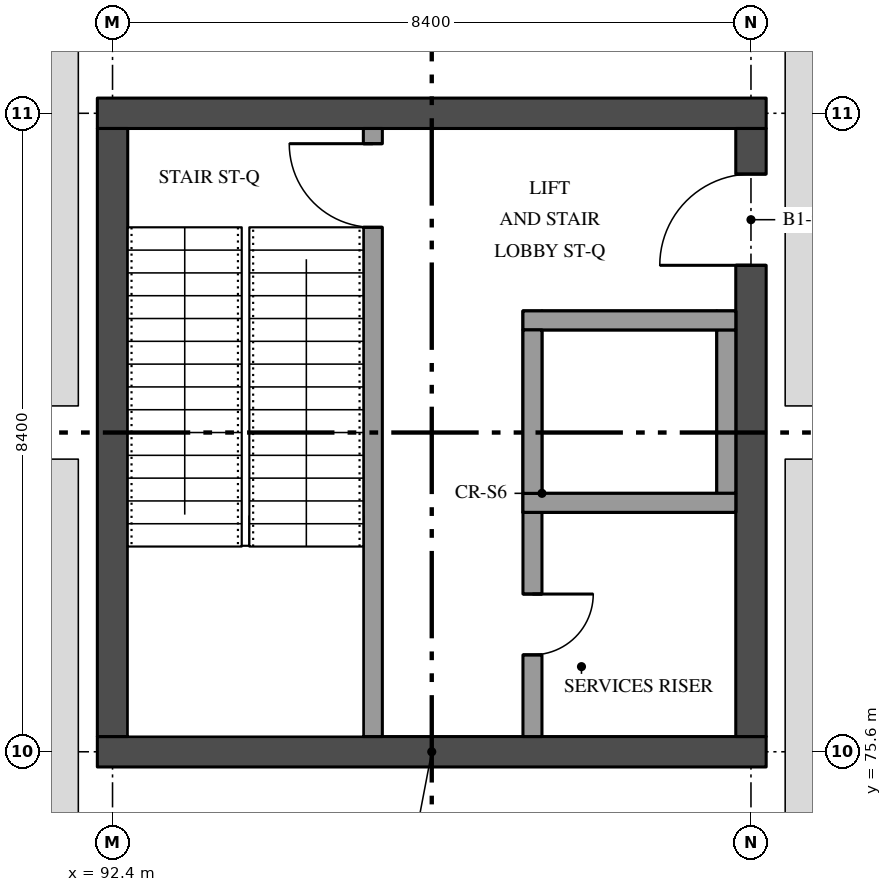
"""IFC4 building model, lengths in metres.
Left out: names, types, materials, properties, quantities, classifications, styles, units other than length and angle.
Written with IfcOpenShell. Run it as: python <this file> out.ifc"""

import sys

from ifc_helpers import new_model, si_unit, direction, frame, frame_2d, origin, place, context, subcontext, project, spatial, rectangle, extrude, element, fill, save


model = new_model("IFC4")
c1 = context("Model", 3, precision=1e-05, world=origin(), true_north=direction((0.0, 1.0)))
c2 = subcontext(c1, "Body", "Model", "MODEL_VIEW")
j1 = project(units=[si_unit("LENGTHUNIT", "METRE"), si_unit("PLANEANGLEUNIT", "RADIAN")], contexts=[c1])
p1 = place(None, origin())
s1 = spatial("IfcSite", under=j1, at=p1, CompositionType="ELEMENT")
p2 = place(p1, origin())
s2 = spatial("IfcBuilding", under=s1, at=p2, CompositionType="ELEMENT")
p3 = place(p2, frame((0.0, 0.0, -4.5)))
s3 = spatial("IfcBuildingStorey", under=s2, at=p3, CompositionType="ELEMENT", Elevation=-4.5)
for number, where, z_axis, x_axis in (
    (1, (92.2, 75.6, 0.0), (0.0, 0.0, 1.0), (1.0, 0.0, 0.0)),
    (2, (92.2, 84.0, 0.0), (0.0, 0.0, 1.0), (1.0, 0.0, 0.0)),
):
    element("IfcWall", number, at=place(p3, frame(where, z_axis=z_axis, x_axis=x_axis)), inside=s3, PredefinedType="SHEAR", context=c2, shape_type="SweptSolid", body=[
        extrude(rectangle(XDim=8.8, YDim=0.4, at=frame_2d((4.4, 0.0))), origin(), (0.0, 0.0, 1.0), 4.05),
    ])
p4 = place(p3, frame((92.4, 75.8, 0.0), z_axis=(0.0, 0.0, 1.0), x_axis=(0.0, 1.0, 0.0)))
e3 = element("IfcWall", 3, at=p4, inside=s3, PredefinedType="SHEAR", context=c2, shape_type="SweptSolid", body=[
    extrude(rectangle(XDim=8.0, YDim=0.4, at=frame_2d((4.0, 0.0))), origin(), (0.0, 0.0, 1.0), 4.05),
])
p5 = place(p3, frame((100.8, 75.8, 0.0), z_axis=(0.0, 0.0, 1.0), x_axis=(0.0, 1.0, 0.0)))
e4 = element("IfcWall", 4, at=p5, inside=s3, PredefinedType="SHEAR", context=c2, shape_type="SweptSolid", body=[
    extrude(rectangle(XDim=8.0, YDim=0.4, at=frame_2d((4.0, 0.0))), origin(), (0.0, 0.0, 1.0), 4.05),
])
p6 = place(p5, frame((6.2, 0.0, 0.0)))
e5 = element("IfcOpeningElement", 5, at=p6, cuts=e4, PredefinedType="OPENING", context=c2, shape_type="SweptSolid", body=[
    extrude(rectangle(XDim=1.2, YDim=2.1, at=frame_2d((0.6, 1.05))), frame((0.0, 0.21, 0.0), z_axis=(0.0, -1.0, 0.0), x_axis=(1.0, 0.0, 0.0)), (0.0, 0.0, 1.0), 0.42),
])
p7 = place(p3, frame((95.825, 83.8, 0.0), z_axis=(0.0, 0.0, 1.0), x_axis=(0.0, -1.0, 0.0)))
e6 = element("IfcWall", 6, at=p7, inside=s3, PredefinedType="SOLIDWALL", context=c2, shape_type="SweptSolid", body=[
    extrude(rectangle(XDim=8.0, YDim=0.25, at=frame_2d((4.0, 0.0))), origin(), (0.0, 0.0, 1.0), 4.05),
])
p8 = place(p7, frame((0.2, 0.0, 0.0)))
e7 = element("IfcOpeningElement", 7, at=p8, cuts=e6, PredefinedType="OPENING", context=c2, shape_type="SweptSolid", body=[
    extrude(rectangle(XDim=1.1, YDim=2.1, at=frame_2d((0.55, 1.05))), frame((0.0, 0.135, 0.0), z_axis=(0.0, -1.0, 0.0), x_axis=(1.0, 0.0, 0.0)), (0.0, 0.0, 1.0), 0.27),
])
p9 = place(p3, frame((97.925, 78.75, 0.0), z_axis=(0.0, 0.0, 1.0), x_axis=(0.0, -1.0, 0.0)))
e8 = element("IfcWall", 8, at=p9, inside=s3, PredefinedType="SOLIDWALL", context=c2, shape_type="SweptSolid", body=[
    extrude(rectangle(XDim=2.95, YDim=0.25, at=frame_2d((1.475, 0.0))), origin(), (0.0, 0.0, 1.0), 4.05),
])
p10 = place(p9, frame((1.075, 0.0, 0.0)))
e9 = element("IfcOpeningElement", 9, at=p10, cuts=e8, PredefinedType="OPENING", context=c2, shape_type="SweptSolid", body=[
    extrude(rectangle(XDim=0.8, YDim=2.1, at=frame_2d((0.4, 1.05))), frame((0.0, 0.135, 0.0), z_axis=(0.0, -1.0, 0.0), x_axis=(1.0, 0.0, 0.0)), (0.0, 0.0, 1.0), 0.27),
])
p11 = place(p3, frame((100.475, 78.75, 3.1), z_axis=(0.0, 0.0, 1.0), x_axis=(0.0, 1.0, 0.0)))
e10 = element("IfcWall", 10, at=p11, inside=s3, PredefinedType="SOLIDWALL", context=c2, shape_type="SweptSolid", body=[
    extrude(rectangle(XDim=2.65, YDim=0.25, at=frame_2d((1.325, 0.0))), origin(), (0.0, 0.0, 1.0), 0.95),
])
for number, where, z_axis, x_axis in (
    (11, (98.05, 81.275, 3.1), (0.0, 0.0, 1.0), (1.0, 0.0, 0.0)),
    (12, (98.05, 78.875, 3.1), (0.0, 0.0, 1.0), (1.0, 0.0, 0.0)),
):
    element("IfcWall", number, at=place(p3, frame(where, z_axis=z_axis, x_axis=x_axis)), inside=s3, PredefinedType="SOLIDWALL", context=c2, shape_type="SweptSolid", body=[
        extrude(rectangle(XDim=2.3, YDim=0.25, at=frame_2d((1.15, 0.0))), origin(), (0.0, 0.0, 1.0), 0.95),
    ])
p12 = place(p3, frame((97.925, 78.75, 3.1), z_axis=(0.0, 0.0, 1.0), x_axis=(0.0, 1.0, 0.0)))
e13 = element("IfcWall", 13, at=p12, inside=s3, PredefinedType="SOLIDWALL", context=c2, shape_type="SweptSolid", body=[
    extrude(rectangle(XDim=2.65, YDim=0.25, at=frame_2d((1.325, 0.0))), origin(), (0.0, 0.0, 1.0), 0.95),
])
p13 = place(p3, frame((100.475, 79.0, 0.0), z_axis=(0.0, 0.0, 1.0), x_axis=(0.0, 1.0, 0.0)))
e14 = element("IfcWall", 14, at=p13, inside=s3, PredefinedType="SOLIDWALL", context=c2, shape_type="SweptSolid", body=[
    extrude(rectangle(XDim=2.15, YDim=0.25, at=frame_2d((1.075, 0.0))), origin(), (0.0, 0.0, 1.0), 2.85),
])
for number, where, z_axis, x_axis in (
    (15, (97.8, 81.275, 0.0), (0.0, 0.0, 1.0), (1.0, 0.0, 0.0)),
    (16, (97.8, 78.875, 0.0), (0.0, 0.0, 1.0), (1.0, 0.0, 0.0)),
):
    element("IfcWall", number, at=place(p3, frame(where, z_axis=z_axis, x_axis=x_axis)), inside=s3, PredefinedType="SOLIDWALL", context=c2, shape_type="SweptSolid", body=[
        extrude(rectangle(XDim=2.8, YDim=0.25, at=frame_2d((1.4, 0.0))), origin(), (0.0, 0.0, 1.0), 2.85),
    ])
p14 = place(p3, frame((97.925, 79.0, 0.0), z_axis=(0.0, 0.0, 1.0), x_axis=(0.0, 1.0, 0.0)))
e17 = element("IfcWall", 17, at=p14, inside=s3, PredefinedType="SOLIDWALL", context=c2, shape_type="SweptSolid", body=[
    extrude(rectangle(XDim=2.15, YDim=0.25, at=frame_2d((1.075, 0.0))), origin(), (0.0, 0.0, 1.0), 2.85),
])
p15 = place(p6, origin())
e18 = element("IfcDoor", 18, at=p15, inside=s3, OperationType="SINGLE_SWING_RIGHT", PredefinedType="DOOR", context=c2, shape_type="SweptSolid", body=[
    extrude(rectangle(XDim=1.2, YDim=2.1, at=frame_2d((0.6, 1.05))), frame((0.0, 0.035, 0.0), z_axis=(0.0, -1.0, 0.0), x_axis=(1.0, 0.0, 0.0)), (0.0, 0.0, 1.0), 0.07),
])
fill(e5, e18)
p16 = place(p10, origin())
e19 = element("IfcDoor", 19, at=p16, inside=s3, OperationType="SINGLE_SWING_RIGHT", PredefinedType="DOOR", context=c2, shape_type="SweptSolid", body=[
    extrude(rectangle(XDim=0.8, YDim=2.1, at=frame_2d((0.4, 1.05))), frame((0.0, 0.035, 0.0), z_axis=(0.0, -1.0, 0.0), x_axis=(1.0, 0.0, 0.0)), (0.0, 0.0, 1.0), 0.07),
])
fill(e9, e19)
p17 = place(p8, frame((1.1, 0.0, 0.0), z_axis=(0.0, 0.0, 1.0), x_axis=(-1.0, 0.0, 0.0)))
e20 = element("IfcDoor", 20, at=p17, inside=s3, OperationType="SINGLE_SWING_LEFT", PredefinedType="DOOR", context=c2, shape_type="SweptSolid", body=[
    extrude(rectangle(XDim=1.1, YDim=2.1, at=frame_2d((0.55, 1.05))), frame((0.0, 0.035, 0.0), z_axis=(0.0, -1.0, 0.0), x_axis=(1.0, 0.0, 0.0)), (0.0, 0.0, 1.0), 0.07),
])
fill(e7, e20)
save(model, sys.argv[1])
